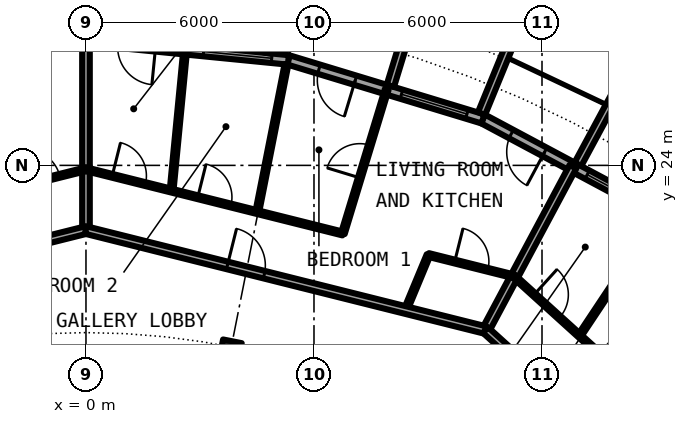
"""IFC4 building model, lengths in metres.
Left out: names, types, materials, properties, quantities, classifications, styles, units other than length and angle.
Written with IfcOpenShell. Run it as: python <this file> out.ifc"""

import sys

from ifc_helpers import new_model, si_unit, direction, frame, frame_2d, origin, origin_2d, place, context, subcontext, project, spatial, rectangle, i_section, extrude, element, fill, save


model = new_model("IFC4")
c1 = context("Model", 3, precision=1e-05, world=origin(), true_north=direction((0.0, 1.0)))
c2 = subcontext(c1, "Body", "Model", "MODEL_VIEW")
j1 = project(units=[si_unit("LENGTHUNIT", "METRE"), si_unit("PLANEANGLEUNIT", "RADIAN")], contexts=[c1])
p1 = place(None, origin())
s1 = spatial("IfcSite", under=j1, at=p1, CompositionType="ELEMENT")
p2 = place(p1, origin())
s2 = spatial("IfcBuilding", under=s1, at=p2, CompositionType="ELEMENT")
p3 = place(p2, frame((0.0, 0.0, 151.3)))
s3 = spatial("IfcBuildingStorey", under=s2, at=p3, CompositionType="ELEMENT", Elevation=151.3)
p4 = place(p3, frame((3.824, 19.223, 0.0), z_axis=(0.0, 0.0, 1.0), x_axis=(0.195090322016, 0.980785280403, 0.0)))
e1 = element("IfcColumn", 1, at=p4, inside=s3, PredefinedType="COLUMN", context=c2, shape_type="SweptSolid", body=[
    extrude(i_section(OverallWidth=0.3, OverallDepth=0.5, WebThickness=0.014, FlangeThickness=0.028, FilletRadius=0.027, at=origin_2d()), origin(), (0.0, 0.0, 1.0), 3.05),
])
p5 = place(p3, frame((15.167, 22.699, 0.0), z_axis=(0.0, 0.0, 1.0), x_axis=(-0.881915646801, 0.471407246368, 0.0)))
e2 = element("IfcWall", 2, at=p5, inside=s3, PredefinedType="SOLIDWALL", context=c2, shape_type="SweptSolid", body=[
    extrude(rectangle(XDim=5.352, YDim=0.25, at=frame_2d((2.676, 0.0))), origin(), (0.0, 0.0, 1.0), 2.7),
])
p6 = place(p5, frame((0.441, 0.0, 0.3)))
e3 = element("IfcOpeningElement", 3, at=p6, cuts=e2, PredefinedType="OPENING", context=c2, shape_type="SweptSolid", body=[
    extrude(rectangle(XDim=1.8, YDim=2.1, at=frame_2d((0.9, 1.05))), frame((0.0, 0.135, 0.0), z_axis=(0.0, -1.0, 0.0), x_axis=(1.0, 0.0, 0.0)), (0.0, 0.0, 1.0), 0.27),
])
p7 = place(p5, frame((3.51, 0.0, 0.0)))
e4 = element("IfcOpeningElement", 4, at=p7, cuts=e2, PredefinedType="OPENING", context=c2, shape_type="SweptSolid", body=[
    extrude(rectangle(XDim=1.0, YDim=2.2, at=frame_2d((0.5, 1.1))), frame((0.0, 0.135, 0.0), z_axis=(0.0, -1.0, 0.0), x_axis=(1.0, 0.0, 0.0)), (0.0, 0.0, 1.0), 0.27),
])
p8 = place(p3, frame((12.945, 24.029, -0.03), z_axis=(0.0, 0.0, 1.0), x_axis=(0.474424310775, 0.88029629861, 0.0)))
e5 = element("IfcWall", 5, at=p8, inside=s3, PredefinedType="SOLIDWALL", context=c2, shape_type="SweptSolid", body=[
    extrude(rectangle(XDim=3.006, YDim=0.2, at=frame_2d((1.503, 0.0))), origin(), (0.0, 0.0, 1.0), 2.73),
])
p9 = place(p3, frame((10.447, 25.222, 0.0), z_axis=(0.0, 0.0, 1.0), x_axis=(-0.956965678721, 0.290201119486, 0.0)))
e6 = element("IfcWall", 6, at=p9, inside=s3, PredefinedType="SOLIDWALL", context=c2, shape_type="SweptSolid", body=[
    extrude(rectangle(XDim=5.351, YDim=0.25, at=frame_2d((2.676, 0.0))), origin(), (0.0, 0.0, 1.0), 2.7),
])
p10 = place(p9, frame((0.441, 0.0, 0.3)))
e7 = element("IfcOpeningElement", 7, at=p10, cuts=e6, PredefinedType="OPENING", context=c2, shape_type="SweptSolid", body=[
    extrude(rectangle(XDim=1.8, YDim=2.1, at=frame_2d((0.9, 1.05))), frame((0.0, 0.135, 0.0), z_axis=(0.0, -1.0, 0.0), x_axis=(1.0, 0.0, 0.0)), (0.0, 0.0, 1.0), 0.27),
])
p11 = place(p9, frame((3.51, 0.0, 0.0)))
e8 = element("IfcOpeningElement", 8, at=p11, cuts=e6, PredefinedType="OPENING", context=c2, shape_type="SweptSolid", body=[
    extrude(rectangle(XDim=1.0, YDim=2.2, at=frame_2d((0.5, 1.1))), frame((0.0, 0.135, 0.0), z_axis=(0.0, -1.0, 0.0), x_axis=(1.0, 0.0, 0.0)), (0.0, 0.0, 1.0), 0.27),
])
p12 = place(p3, frame((10.409, 25.364, -0.03), z_axis=(0.0, 0.0, 1.0), x_axis=(0.379509886562, 0.925187681501, 0.0)))
e9 = element("IfcWall", 9, at=p12, inside=s3, PredefinedType="SOLIDWALL", context=c2, shape_type="SweptSolid", body=[
    extrude(rectangle(XDim=2.883, YDim=0.2, at=frame_2d((1.441, 0.0))), origin(), (0.0, 0.0, 1.0), 2.73),
])
p13 = place(p3, frame((8.009, 26.092, -0.03), z_axis=(0.0, 0.0, 1.0), x_axis=(0.293406695073, 0.955987715029, 0.0)))
e10 = element("IfcWall", 10, at=p13, inside=s3, PredefinedType="SOLIDWALL", context=c2, shape_type="SweptSolid", body=[
    extrude(rectangle(XDim=3.006, YDim=0.2, at=frame_2d((1.503, 0.0))), origin(), (0.0, 0.0, 1.0), 2.73),
])
p14 = place(p3, frame((5.326, 26.775, 0.0), z_axis=(0.0, 0.0, 1.0), x_axis=(-0.995173996315, 0.098126026407, 0.0)))
e11 = element("IfcWall", 11, at=p14, inside=s3, PredefinedType="SOLIDWALL", context=c2, shape_type="SweptSolid", body=[
    extrude(rectangle(XDim=5.352, YDim=0.25, at=frame_2d((2.676, 0.0))), origin(), (0.0, 0.0, 1.0), 2.7),
])
p15 = place(p14, frame((0.441, 0.0, 0.3)))
e12 = element("IfcOpeningElement", 12, at=p15, cuts=e11, PredefinedType="OPENING", context=c2, shape_type="SweptSolid", body=[
    extrude(rectangle(XDim=1.8, YDim=2.1, at=frame_2d((0.9, 1.05))), frame((0.0, 0.135, 0.0), z_axis=(0.0, -1.0, 0.0), x_axis=(1.0, 0.0, 0.0)), (0.0, 0.0, 1.0), 0.27),
])
p16 = place(p14, frame((3.51, 0.0, 0.0)))
e13 = element("IfcOpeningElement", 13, at=p16, cuts=e11, PredefinedType="OPENING", context=c2, shape_type="SweptSolid", body=[
    extrude(rectangle(XDim=1.0, YDim=2.2, at=frame_2d((0.5, 1.1))), frame((0.0, 0.135, 0.0), z_axis=(0.0, -1.0, 0.0), x_axis=(1.0, 0.0, 0.0)), (0.0, 0.0, 1.0), 0.27),
])
p17 = place(p3, frame((4.769, 26.956, -0.03), z_axis=(0.0, 0.0, 1.0), x_axis=(0.174056778901, 0.984735618183, 0.0)))
e14 = element("IfcWall", 14, at=p17, inside=s3, PredefinedType="SOLIDWALL", context=c2, shape_type="SweptSolid", body=[
    extrude(rectangle(XDim=2.925, YDim=0.2, at=frame_2d((1.462, 0.0))), origin(), (0.0, 0.0, 1.0), 2.73),
])
p18 = place(p3, frame((0.0, 27.3, 0.0), z_axis=(0.0, 0.0, 1.0), x_axis=(-0.995173996315, -0.098126026407, 0.0)))
e15 = element("IfcWall", 15, at=p18, inside=s3, PredefinedType="SOLIDWALL", context=c2, shape_type="SweptSolid", body=[
    extrude(rectangle(XDim=5.352, YDim=0.25, at=frame_2d((2.676, 0.0))), origin(), (0.0, 0.0, 1.0), 2.7),
])
p19 = place(p18, frame((0.441, 0.0, 0.3)))
e16 = element("IfcOpeningElement", 16, at=p19, cuts=e15, PredefinedType="OPENING", context=c2, shape_type="SweptSolid", body=[
    extrude(rectangle(XDim=1.8, YDim=2.1, at=frame_2d((0.9, 1.05))), frame((0.0, 0.135, 0.0), z_axis=(0.0, -1.0, 0.0), x_axis=(1.0, 0.0, 0.0)), (0.0, 0.0, 1.0), 0.27),
])
p20 = place(p18, frame((3.51, 0.0, 0.0)))
e17 = element("IfcOpeningElement", 17, at=p20, cuts=e15, PredefinedType="OPENING", context=c2, shape_type="SweptSolid", body=[
    extrude(rectangle(XDim=1.0, YDim=2.2, at=frame_2d((0.5, 1.1))), frame((0.0, 0.135, 0.0), z_axis=(0.0, -1.0, 0.0), x_axis=(1.0, 0.0, 0.0)), (0.0, 0.0, 1.0), 0.27),
])
p21 = place(p3, frame((8.41, 20.193, 0.0), z_axis=(0.0, 0.0, 1.0), x_axis=(0.384228756538, 0.923237923099, 0.0)))
e18 = element("IfcWall", 18, at=p21, inside=s3, PredefinedType="PARTITIONING", context=c2, shape_type="SweptSolid", body=[
    extrude(rectangle(XDim=1.569, YDim=0.1, at=frame_2d((0.785, 0.0))), origin(), (0.0, 0.0, 1.0), 2.7),
])
p22 = place(p3, frame((0.0, 22.3, 0.0), z_axis=(0.0, 0.0, 1.0), x_axis=(0.0, 1.0, 0.0)))
e19 = element("IfcWall", 19, at=p22, inside=s3, PredefinedType="PARTITIONING", context=c2, shape_type="SweptSolid", body=[
    extrude(rectangle(XDim=4.875, YDim=0.2, at=frame_2d((2.438, 0.0))), origin(), (0.0, 0.0, 1.0), 2.7),
])
p23 = place(p3, frame((2.253, 23.336, 0.0), z_axis=(0.0, 0.0, 1.0), x_axis=(0.09626981452, 0.995355274669, 0.0)))
e20 = element("IfcWall", 20, at=p23, inside=s3, PredefinedType="PARTITIONING", context=c2, shape_type="SweptSolid", body=[
    extrude(rectangle(XDim=3.73, YDim=0.1, at=frame_2d((1.865, 0.0))), origin(), (0.0, 0.0, 1.0), 2.7),
])
p24 = place(p3, frame((4.507, 22.771, 0.0), z_axis=(0.0, 0.0, 1.0), x_axis=(0.194030211642, 0.980995554001, 0.0)))
e21 = element("IfcWall", 21, at=p24, inside=s3, PredefinedType="PARTITIONING", context=c2, shape_type="SweptSolid", body=[
    extrude(rectangle(XDim=3.962, YDim=0.1, at=frame_2d((1.981, 0.0))), origin(), (0.0, 0.0, 1.0), 2.7),
])
p25 = place(p3, frame((6.76, 22.207, 0.0), z_axis=(0.0, 0.0, 1.0), x_axis=(0.291291575636, 0.956634317785, 0.0)))
e22 = element("IfcWall", 22, at=p25, inside=s3, PredefinedType="PARTITIONING", context=c2, shape_type="SweptSolid", body=[
    extrude(rectangle(XDim=3.962, YDim=0.1, at=frame_2d((1.981, 0.0))), origin(), (0.0, 0.0, 1.0), 2.7),
])
p26 = place(p25, frame((1.531, 0.0, 0.0)))
e23 = element("IfcOpeningElement", 23, at=p26, cuts=e22, PredefinedType="OPENING", context=c2, shape_type="SweptSolid", body=[
    extrude(rectangle(XDim=0.9, YDim=2.3, at=frame_2d((0.45, 1.15))), frame((0.0, 0.06, 0.0), z_axis=(0.0, -1.0, 0.0), x_axis=(1.0, 0.0, 0.0)), (0.0, 0.0, 1.0), 0.12),
])
p27 = place(p3, frame((10.516, 19.665, 0.0), z_axis=(0.0, 0.0, 1.0), x_axis=(0.471388689095, 0.881925565903, 0.0)))
e24 = element("IfcWall", 24, at=p27, inside=s3, PredefinedType="PARTITIONING", context=c2, shape_type="SweptSolid", body=[
    extrude(rectangle(XDim=4.875, YDim=0.2, at=frame_2d((2.438, 0.0))), origin(), (0.0, 0.0, 1.0), 2.7),
])
p28 = place(p3, frame((12.988, 19.518, 0.0), z_axis=(0.0, 0.0, 1.0), x_axis=(0.553823887887, 0.83263383381, 0.0)))
e25 = element("IfcWall", 25, at=p28, inside=s3, PredefinedType="PARTITIONING", context=c2, shape_type="SweptSolid", body=[
    extrude(rectangle(XDim=3.73, YDim=0.1, at=frame_2d((1.865, 0.0))), origin(), (0.0, 0.0, 1.0), 2.7),
])
p29 = place(p3, frame((-10.512, 19.667, 0.0), z_axis=(0.0, 0.0, 1.0), x_axis=(0.970086843848, 0.242758141765, 0.0)))
e26 = element("IfcWall", 26, at=p29, inside=s3, PredefinedType="PARTITIONING", context=c2, shape_type="SweptSolid", body=[
    extrude(rectangle(XDim=10.842, YDim=0.2, at=frame_2d((5.421, 0.0))), origin(), (0.0, 0.0, 1.0), 2.7),
])
p30 = place(p29, frame((6.002, 0.0, 0.0)))
e27 = element("IfcOpeningElement", 27, at=p30, cuts=e26, PredefinedType="OPENING", context=c2, shape_type="SweptSolid", body=[
    extrude(rectangle(XDim=1.0, YDim=2.3, at=frame_2d((0.5, 1.15))), frame((0.0, 0.11, 0.0), z_axis=(0.0, -1.0, 0.0), x_axis=(1.0, 0.0, 0.0)), (0.0, 0.0, 1.0), 0.22),
])
p31 = place(p3, frame((-0.006, 22.299, 0.0), z_axis=(0.0, 0.0, 1.0), x_axis=(0.970086843848, -0.242758141765, 0.0)))
e28 = element("IfcWall", 28, at=p31, inside=s3, PredefinedType="PARTITIONING", context=c2, shape_type="SweptSolid", body=[
    extrude(rectangle(XDim=10.842, YDim=0.2, at=frame_2d((5.421, 0.0))), origin(), (0.0, 0.0, 1.0), 2.7),
])
p32 = place(p31, frame((3.841, 0.0, 0.0)))
e29 = element("IfcOpeningElement", 29, at=p32, cuts=e28, PredefinedType="OPENING", context=c2, shape_type="SweptSolid", body=[
    extrude(rectangle(XDim=1.0, YDim=2.3, at=frame_2d((0.5, 1.15))), frame((0.0, 0.11, 0.0), z_axis=(0.0, -1.0, 0.0), x_axis=(1.0, 0.0, 0.0)), (0.0, 0.0, 1.0), 0.22),
])
p33 = place(p3, frame((10.512, 19.667, 0.0), z_axis=(0.0, 0.0, 1.0), x_axis=(0.740947367223, -0.671563101283, 0.0)))
e30 = element("IfcWall", 30, at=p33, inside=s3, PredefinedType="PARTITIONING", context=c2, shape_type="SweptSolid", body=[
    extrude(rectangle(XDim=10.837, YDim=0.2, at=frame_2d((5.419, 0.0))), origin(), (0.0, 0.0, 1.0), 2.7),
])
p34 = place(p33, frame((3.835, 0.0, 0.0)))
e31 = element("IfcOpeningElement", 31, at=p34, cuts=e30, PredefinedType="OPENING", context=c2, shape_type="SweptSolid", body=[
    extrude(rectangle(XDim=1.0, YDim=2.3, at=frame_2d((0.5, 1.15))), frame((0.0, 0.11, 0.0), z_axis=(0.0, -1.0, 0.0), x_axis=(1.0, 0.0, 0.0)), (0.0, 0.0, 1.0), 0.22),
])
p35 = place(p3, frame((-6.76, 22.206, 0.0), z_axis=(0.0, 0.0, 1.0), x_axis=(0.970070358667, 0.242824008772, 0.0)))
e32 = element("IfcWall", 32, at=p35, inside=s3, PredefinedType="PARTITIONING", context=c2, shape_type="SweptSolid", body=[
    extrude(rectangle(XDim=6.972, YDim=0.1, at=frame_2d((3.486, 0.0))), origin(), (0.0, 0.0, 1.0), 2.7),
])
p36 = place(p35, frame((3.037, 0.0, 0.0)))
e33 = element("IfcOpeningElement", 33, at=p36, cuts=e32, PredefinedType="OPENING", context=c2, shape_type="SweptSolid", body=[
    extrude(rectangle(XDim=0.9, YDim=2.3, at=frame_2d((0.45, 1.15))), frame((0.0, 0.06, 0.0), z_axis=(0.0, -1.0, 0.0), x_axis=(1.0, 0.0, 0.0)), (0.0, 0.0, 1.0), 0.12),
])
p37 = place(p35, frame((5.357, 0.0, 0.0)))
e34 = element("IfcOpeningElement", 34, at=p37, cuts=e32, PredefinedType="OPENING", context=c2, shape_type="SweptSolid", body=[
    extrude(rectangle(XDim=0.9, YDim=2.3, at=frame_2d((0.45, 1.15))), frame((0.0, 0.06, 0.0), z_axis=(0.0, -1.0, 0.0), x_axis=(1.0, 0.0, 0.0)), (0.0, 0.0, 1.0), 0.12),
])
p38 = place(p3, frame((-0.003, 23.899, 0.0), z_axis=(0.0, 0.0, 1.0), x_axis=(0.970070358667, -0.242824008772, 0.0)))
e35 = element("IfcWall", 35, at=p38, inside=s3, PredefinedType="PARTITIONING", context=c2, shape_type="SweptSolid", body=[
    extrude(rectangle(XDim=6.972, YDim=0.1, at=frame_2d((3.486, 0.0))), origin(), (0.0, 0.0, 1.0), 2.7),
])
p39 = place(p38, frame((3.035, 0.0, 0.0)))
e36 = element("IfcOpeningElement", 36, at=p39, cuts=e35, PredefinedType="OPENING", context=c2, shape_type="SweptSolid", body=[
    extrude(rectangle(XDim=0.9, YDim=2.3, at=frame_2d((0.45, 1.15))), frame((0.0, 0.06, 0.0), z_axis=(0.0, -1.0, 0.0), x_axis=(1.0, 0.0, 0.0)), (0.0, 0.0, 1.0), 0.12),
])
p40 = place(p38, frame((0.715, 0.0, 0.0)))
e37 = element("IfcOpeningElement", 37, at=p40, cuts=e35, PredefinedType="OPENING", context=c2, shape_type="SweptSolid", body=[
    extrude(rectangle(XDim=0.9, YDim=2.3, at=frame_2d((0.45, 1.15))), frame((0.0, 0.06, 0.0), z_axis=(0.0, -1.0, 0.0), x_axis=(1.0, 0.0, 0.0)), (0.0, 0.0, 1.0), 0.12),
])
p41 = place(p3, frame((9.013, 21.642, 0.0), z_axis=(0.0, 0.0, 1.0), x_axis=(0.970049686104, -0.242906579758, 0.0)))
e38 = element("IfcWall", 38, at=p41, inside=s3, PredefinedType="PARTITIONING", context=c2, shape_type="SweptSolid", body=[
    extrude(rectangle(XDim=2.323, YDim=0.1, at=frame_2d((1.161, 0.0))), origin(), (0.0, 0.0, 1.0), 2.7),
])
p42 = place(p41, frame((0.711, 0.0, 0.0)))
e39 = element("IfcOpeningElement", 39, at=p42, cuts=e38, PredefinedType="OPENING", context=c2, shape_type="SweptSolid", body=[
    extrude(rectangle(XDim=0.9, YDim=2.3, at=frame_2d((0.45, 1.15))), frame((0.0, 0.06, 0.0), z_axis=(0.0, -1.0, 0.0), x_axis=(1.0, 0.0, 0.0)), (0.0, 0.0, 1.0), 0.12),
])
p43 = place(p3, frame((11.266, 21.078, 0.0), z_axis=(0.0, 0.0, 1.0), x_axis=(0.74097115376, -0.671536856245, 0.0)))
e40 = element("IfcWall", 40, at=p43, inside=s3, PredefinedType="PARTITIONING", context=c2, shape_type="SweptSolid", body=[
    extrude(rectangle(XDim=6.969, YDim=0.1, at=frame_2d((3.484, 0.0))), origin(), (0.0, 0.0, 1.0), 2.7),
])
p44 = place(p43, frame((3.034, 0.0, 0.0)))
e41 = element("IfcOpeningElement", 41, at=p44, cuts=e40, PredefinedType="OPENING", context=c2, shape_type="SweptSolid", body=[
    extrude(rectangle(XDim=0.9, YDim=2.3, at=frame_2d((0.45, 1.15))), frame((0.0, 0.06, 0.0), z_axis=(0.0, -1.0, 0.0), x_axis=(1.0, 0.0, 0.0)), (0.0, 0.0, 1.0), 0.12),
])
p45 = place(p43, frame((0.712, 0.0, 0.0)))
e42 = element("IfcOpeningElement", 42, at=p45, cuts=e40, PredefinedType="OPENING", context=c2, shape_type="SweptSolid", body=[
    extrude(rectangle(XDim=0.9, YDim=2.3, at=frame_2d((0.45, 1.15))), frame((0.0, 0.06, 0.0), z_axis=(0.0, -1.0, 0.0), x_axis=(1.0, 0.0, 0.0)), (0.0, 0.0, 1.0), 0.12),
])
p46 = place(p6, origin())
e43 = element("IfcWindow", 43, at=p46, inside=s3, PartitioningType="SINGLE_PANEL", PredefinedType="WINDOW", context=c2, shape_type="SweptSolid", body=[
    extrude(rectangle(XDim=1.8, YDim=2.1, at=frame_2d((0.9, 1.05))), frame((0.0, 0.03, 0.0), z_axis=(0.0, -1.0, 0.0), x_axis=(1.0, 0.0, 0.0)), (0.0, 0.0, 1.0), 0.06),
])
fill(e3, e43)
p47 = place(p7, origin())
e44 = element("IfcDoor", 44, at=p47, inside=s3, OperationType="SINGLE_SWING_LEFT", PredefinedType="DOOR", context=c2, shape_type="SweptSolid", body=[
    extrude(rectangle(XDim=1.0, YDim=2.2, at=frame_2d((0.5, 1.1))), frame((0.0, 0.025, 0.0), z_axis=(0.0, -1.0, 0.0), x_axis=(1.0, 0.0, 0.0)), (0.0, 0.0, 1.0), 0.05),
])
fill(e4, e44)
p48 = place(p10, origin())
e45 = element("IfcWindow", 45, at=p48, inside=s3, PartitioningType="SINGLE_PANEL", PredefinedType="WINDOW", context=c2, shape_type="SweptSolid", body=[
    extrude(rectangle(XDim=1.8, YDim=2.1, at=frame_2d((0.9, 1.05))), frame((0.0, 0.03, 0.0), z_axis=(0.0, -1.0, 0.0), x_axis=(1.0, 0.0, 0.0)), (0.0, 0.0, 1.0), 0.06),
])
fill(e7, e45)
p49 = place(p11, origin())
e46 = element("IfcDoor", 46, at=p49, inside=s3, OperationType="SINGLE_SWING_LEFT", PredefinedType="DOOR", context=c2, shape_type="SweptSolid", body=[
    extrude(rectangle(XDim=1.0, YDim=2.2, at=frame_2d((0.5, 1.1))), frame((0.0, 0.025, 0.0), z_axis=(0.0, -1.0, 0.0), x_axis=(1.0, 0.0, 0.0)), (0.0, 0.0, 1.0), 0.05),
])
fill(e8, e46)
p50 = place(p15, origin())
e47 = element("IfcWindow", 47, at=p50, inside=s3, PartitioningType="SINGLE_PANEL", PredefinedType="WINDOW", context=c2, shape_type="SweptSolid", body=[
    extrude(rectangle(XDim=1.8, YDim=2.1, at=frame_2d((0.9, 1.05))), frame((0.0, 0.03, 0.0), z_axis=(0.0, -1.0, 0.0), x_axis=(1.0, 0.0, 0.0)), (0.0, 0.0, 1.0), 0.06),
])
fill(e12, e47)
p51 = place(p45, origin())
e48 = element("IfcDoor", 48, at=p51, inside=s3, OperationType="SINGLE_SWING_LEFT", PredefinedType="DOOR", context=c2, shape_type="SweptSolid", body=[
    extrude(rectangle(XDim=0.9, YDim=2.3, at=frame_2d((0.45, 1.15))), frame((0.0, 0.025, 0.0), z_axis=(0.0, -1.0, 0.0), x_axis=(1.0, 0.0, 0.0)), (0.0, 0.0, 1.0), 0.05),
])
fill(e42, e48)
p52 = place(p32, origin())
e49 = element("IfcDoor", 49, at=p52, inside=s3, OperationType="SINGLE_SWING_LEFT", PredefinedType="DOOR", context=c2, shape_type="SweptSolid", body=[
    extrude(rectangle(XDim=1.0, YDim=2.3, at=frame_2d((0.5, 1.15))), frame((0.0, 0.025, 0.0), z_axis=(0.0, -1.0, 0.0), x_axis=(1.0, 0.0, 0.0)), (0.0, 0.0, 1.0), 0.05),
])
fill(e29, e49)
p53 = place(p42, origin())
e50 = element("IfcDoor", 50, at=p53, inside=s3, OperationType="SINGLE_SWING_RIGHT", PredefinedType="DOOR", context=c2, shape_type="SweptSolid", body=[
    extrude(rectangle(XDim=0.9, YDim=2.3, at=frame_2d((0.45, 1.15))), frame((0.0, 0.025, 0.0), z_axis=(0.0, -1.0, 0.0), x_axis=(1.0, 0.0, 0.0)), (0.0, 0.0, 1.0), 0.05),
])
fill(e39, e50)
p54 = place(p26, origin())
e51 = element("IfcDoor", 51, at=p54, inside=s3, OperationType="SINGLE_SWING_RIGHT", PredefinedType="DOOR", context=c2, shape_type="SweptSolid", body=[
    extrude(rectangle(XDim=0.9, YDim=2.3, at=frame_2d((0.45, 1.15))), frame((0.0, 0.025, 0.0), z_axis=(0.0, -1.0, 0.0), x_axis=(1.0, 0.0, 0.0)), (0.0, 0.0, 1.0), 0.05),
])
fill(e23, e51)
p55 = place(p39, origin())
e52 = element("IfcDoor", 52, at=p55, inside=s3, OperationType="SINGLE_SWING_LEFT", PredefinedType="DOOR", context=c2, shape_type="SweptSolid", body=[
    extrude(rectangle(XDim=0.9, YDim=2.3, at=frame_2d((0.45, 1.15))), frame((0.0, 0.025, 0.0), z_axis=(0.0, -1.0, 0.0), x_axis=(1.0, 0.0, 0.0)), (0.0, 0.0, 1.0), 0.05),
])
fill(e36, e52)
p56 = place(p40, origin())
e53 = element("IfcDoor", 53, at=p56, inside=s3, OperationType="SINGLE_SWING_LEFT", PredefinedType="DOOR", context=c2, shape_type="SweptSolid", body=[
    extrude(rectangle(XDim=0.9, YDim=2.3, at=frame_2d((0.45, 1.15))), frame((0.0, 0.025, 0.0), z_axis=(0.0, -1.0, 0.0), x_axis=(1.0, 0.0, 0.0)), (0.0, 0.0, 1.0), 0.05),
])
fill(e37, e53)
p57 = place(p37, origin())
e54 = element("IfcDoor", 54, at=p57, inside=s3, OperationType="SINGLE_SWING_RIGHT", PredefinedType="DOOR", context=c2, shape_type="SweptSolid", body=[
    extrude(rectangle(XDim=0.9, YDim=2.3, at=frame_2d((0.45, 1.15))), frame((0.0, 0.025, 0.0), z_axis=(0.0, -1.0, 0.0), x_axis=(1.0, 0.0, 0.0)), (0.0, 0.0, 1.0), 0.05),
])
fill(e34, e54)
save(model, sys.argv[1])
